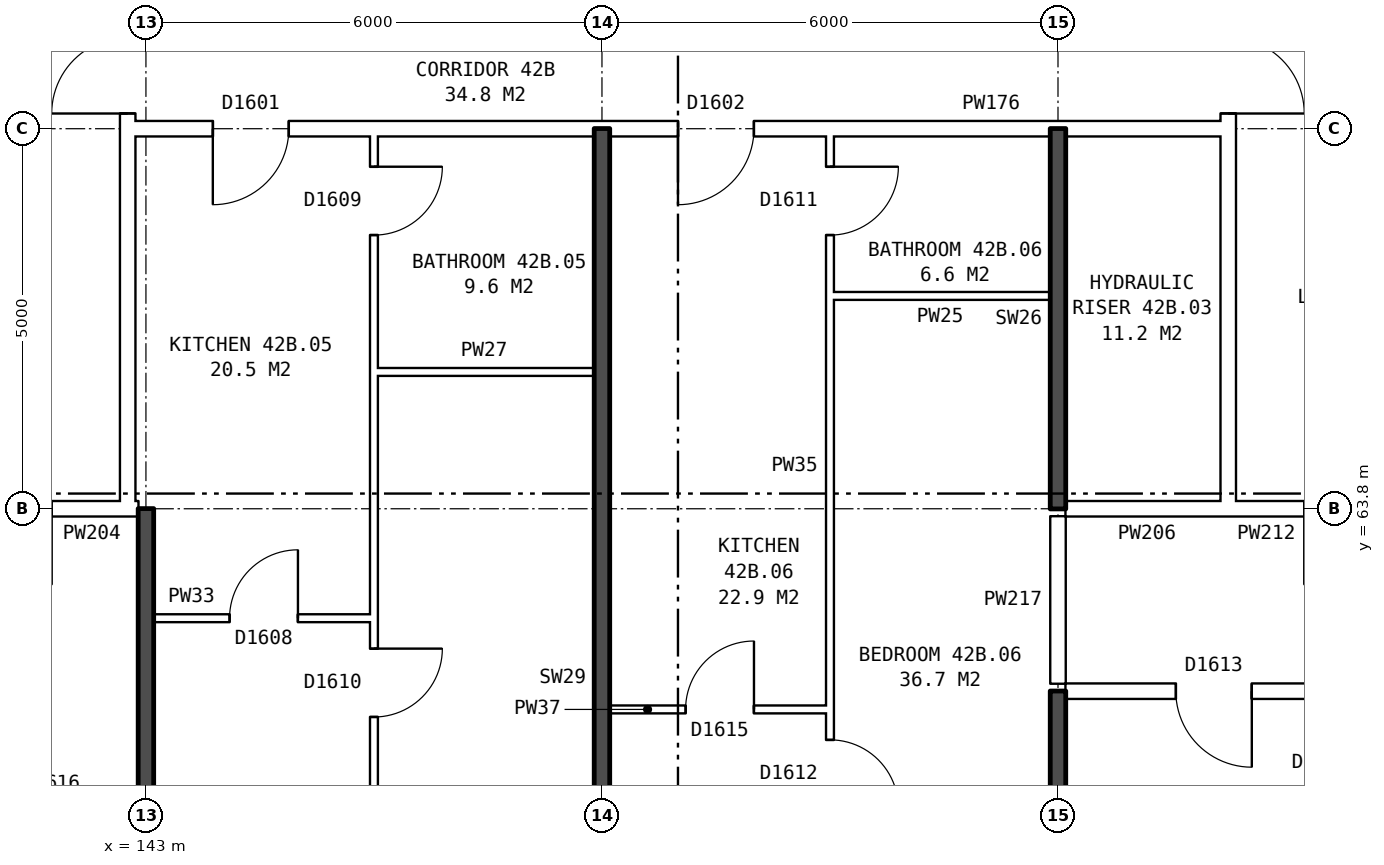
"""IFC4 building model, lengths in metres.
Left out: names, types, materials, properties, quantities, classifications, styles, units other than length and angle.
Written with IfcOpenShell. Run it as: python <this file> out.ifc"""

import sys

from ifc_helpers import new_model, si_unit, direction, frame, frame_2d, origin, place, context, subcontext, project, spatial, rectangle, extrude, element, fill, save


model = new_model("IFC4")
c1 = context("Model", 3, precision=1e-05, world=origin(), true_north=direction((0.0, 1.0)))
c2 = subcontext(c1, "Body", "Model", "MODEL_VIEW")
j1 = project(units=[si_unit("LENGTHUNIT", "METRE"), si_unit("PLANEANGLEUNIT", "RADIAN")], contexts=[c1])
p1 = place(None, origin())
s1 = spatial("IfcSite", under=j1, at=p1, CompositionType="ELEMENT")
p2 = place(p1, origin())
s2 = spatial("IfcBuilding", under=s1, at=p2, CompositionType="ELEMENT")
p3 = place(p2, frame((0.0, 0.0, 151.6)))
s3 = spatial("IfcBuildingStorey", under=s2, at=p3, CompositionType="ELEMENT", Elevation=151.6)
p4 = place(p3, frame((142.76, 63.9, 0.0), z_axis=(0.0, 0.0, 1.0), x_axis=(0.0, 1.0, 0.0)))
e1 = element("IfcWall", 1, at=p4, inside=s3, PredefinedType="PARTITIONING", context=c2, shape_type="SweptSolid", body=[
    extrude(rectangle(XDim=12.2, YDim=0.2, at=frame_2d((6.1, 0.0))), origin(), (0.0, 0.0, 1.0), 2.85),
])
p5 = place(p4, frame((5.1, 0.0, 0.0)))
e2 = element("IfcOpeningElement", 2, at=p5, cuts=e1, PredefinedType="OPENING", context=c2, shape_type="SweptSolid", body=[
    extrude(rectangle(XDim=2.0, YDim=2.1, at=frame_2d((1.0, 1.05))), frame((0.0, 0.11, 0.0), z_axis=(0.0, -1.0, 0.0), x_axis=(1.0, 0.0, 0.0)), (0.0, 0.0, 1.0), 0.22),
])
p6 = place(p3, frame((157.24, 63.9, 0.0), z_axis=(0.0, 0.0, 1.0), x_axis=(0.0, 1.0, 0.0)))
e3 = element("IfcWall", 3, at=p6, inside=s3, PredefinedType="PARTITIONING", context=c2, shape_type="SweptSolid", body=[
    extrude(rectangle(XDim=12.2, YDim=0.2, at=frame_2d((6.1, 0.0))), origin(), (0.0, 0.0, 1.0), 2.85),
])
p7 = place(p6, frame((5.1, 0.0, 0.0)))
e4 = element("IfcOpeningElement", 4, at=p7, cuts=e3, PredefinedType="OPENING", context=c2, shape_type="SweptSolid", body=[
    extrude(rectangle(XDim=2.0, YDim=2.1, at=frame_2d((1.0, 1.05))), frame((0.0, 0.11, 0.0), z_axis=(0.0, -1.0, 0.0), x_axis=(1.0, 0.0, 0.0)), (0.0, 0.0, 1.0), 0.22),
])
p8 = place(p3, frame((149.1, 61.16, 0.0), z_axis=(0.0, 0.0, 1.0), x_axis=(1.0, 0.0, 0.0)))
e5 = element("IfcWall", 5, at=p8, inside=s3, PredefinedType="PARTITIONING", context=c2, shape_type="SweptSolid", body=[
    extrude(rectangle(XDim=2.9, YDim=0.1, at=frame_2d((1.45, 0.0))), origin(), (0.0, 0.0, 1.0), 2.85),
])
p9 = place(p8, frame((1.0, 0.0, 0.0)))
e6 = element("IfcOpeningElement", 6, at=p9, cuts=e5, PredefinedType="OPENING", context=c2, shape_type="SweptSolid", body=[
    extrude(rectangle(XDim=0.9, YDim=2.1, at=frame_2d((0.45, 1.05))), frame((0.0, 0.06, 0.0), z_axis=(0.0, -1.0, 0.0), x_axis=(1.0, 0.0, 0.0)), (0.0, 0.0, 1.0), 0.12),
])
p10 = place(p3, frame((155.1, 61.4, 0.0), z_axis=(0.0, 0.0, 1.0), x_axis=(1.0, 0.0, 0.0)))
e7 = element("IfcWall", 7, at=p10, inside=s3, PredefinedType="PARTITIONING", context=c2, shape_type="SweptSolid", body=[
    extrude(rectangle(XDim=16.04, YDim=0.2, at=frame_2d((8.02, 0.0))), origin(), (0.0, 0.0, 1.0), 2.85),
])
p11 = place(p10, frame((1.45, 0.0, 0.0)))
e8 = element("IfcOpeningElement", 8, at=p11, cuts=e7, PredefinedType="OPENING", context=c2, shape_type="SweptSolid", body=[
    extrude(rectangle(XDim=1.0, YDim=2.1, at=frame_2d((0.5, 1.05))), frame((0.0, 0.11, 0.0), z_axis=(0.0, -1.0, 0.0), x_axis=(1.0, 0.0, 0.0)), (0.0, 0.0, 1.0), 0.22),
])
p12 = place(p10, frame((8.4, 0.0, 0.0)))
e9 = element("IfcOpeningElement", 9, at=p12, cuts=e7, PredefinedType="OPENING", context=c2, shape_type="SweptSolid", body=[
    extrude(rectangle(XDim=1.0, YDim=2.1, at=frame_2d((0.5, 1.05))), frame((0.0, 0.11, 0.0), z_axis=(0.0, -1.0, 0.0), x_axis=(1.0, 0.0, 0.0)), (0.0, 0.0, 1.0), 0.22),
])
p13 = place(p3, frame((143.1, 62.36, 0.0), z_axis=(0.0, 0.0, 1.0), x_axis=(1.0, 0.0, 0.0)))
e10 = element("IfcWall", 10, at=p13, inside=s3, PredefinedType="PARTITIONING", context=c2, shape_type="SweptSolid", body=[
    extrude(rectangle(XDim=2.9, YDim=0.1, at=frame_2d((1.45, 0.0))), origin(), (0.0, 0.0, 1.0), 2.85),
])
p14 = place(p13, frame((1.0, 0.0, 0.0)))
e11 = element("IfcOpeningElement", 11, at=p14, cuts=e10, PredefinedType="OPENING", context=c2, shape_type="SweptSolid", body=[
    extrude(rectangle(XDim=0.9, YDim=2.1, at=frame_2d((0.45, 1.05))), frame((0.0, 0.06, 0.0), z_axis=(0.0, -1.0, 0.0), x_axis=(1.0, 0.0, 0.0)), (0.0, 0.0, 1.0), 0.12),
])
p15 = place(p3, frame((139.76, 63.8, 0.0), z_axis=(0.0, 0.0, 1.0), x_axis=(1.0, 0.0, 0.0)))
e12 = element("IfcWall", 12, at=p15, inside=s3, PredefinedType="PARTITIONING", context=c2, shape_type="SweptSolid", body=[
    extrude(rectangle(XDim=3.0, YDim=0.2, at=frame_2d((1.5, 0.0))), origin(), (0.0, 0.0, 1.0), 2.85),
])
p16 = place(p15, frame((1.0, 0.0, 0.0)))
e13 = element("IfcOpeningElement", 13, at=p16, cuts=e12, PredefinedType="OPENING", context=c2, shape_type="SweptSolid", body=[
    extrude(rectangle(XDim=1.0, YDim=2.1, at=frame_2d((0.5, 1.05))), frame((0.0, 0.11, 0.0), z_axis=(0.0, -1.0, 0.0), x_axis=(1.0, 0.0, 0.0)), (0.0, 0.0, 1.0), 0.22),
])
p17 = place(p3, frame((142.76, 63.8, 0.0), z_axis=(0.0, 0.0, 1.0), x_axis=(1.0, 0.0, 0.0)))
e14 = element("IfcWall", 14, at=p17, inside=s3, PredefinedType="PARTITIONING", context=c2, shape_type="SweptSolid", body=[
    extrude(rectangle(XDim=0.14, YDim=0.2, at=frame_2d((0.07, 0.0))), origin(), (0.0, 0.0, 1.0), 2.85),
])
p18 = place(p3, frame((155.1, 63.8, 0.0), z_axis=(0.0, 0.0, 1.0), x_axis=(1.0, 0.0, 0.0)))
e15 = element("IfcWall", 15, at=p18, inside=s3, PredefinedType="PARTITIONING", context=c2, shape_type="SweptSolid", body=[
    extrude(rectangle(XDim=2.14, YDim=0.2, at=frame_2d((1.07, 0.0))), origin(), (0.0, 0.0, 1.0), 2.85),
])
p19 = place(p3, frame((157.24, 63.8, 0.0), z_axis=(0.0, 0.0, 1.0), x_axis=(1.0, 0.0, 0.0)))
e16 = element("IfcWall", 16, at=p19, inside=s3, PredefinedType="PARTITIONING", context=c2, shape_type="SweptSolid", body=[
    extrude(rectangle(XDim=3.0, YDim=0.2, at=frame_2d((1.5, 0.0))), origin(), (0.0, 0.0, 1.0), 2.85),
])
p20 = place(p19, frame((1.0, 0.0, 0.0)))
e17 = element("IfcOpeningElement", 17, at=p20, cuts=e16, PredefinedType="OPENING", context=c2, shape_type="SweptSolid", body=[
    extrude(rectangle(XDim=1.0, YDim=2.1, at=frame_2d((0.5, 1.05))), frame((0.0, 0.11, 0.0), z_axis=(0.0, -1.0, 0.0), x_axis=(1.0, 0.0, 0.0)), (0.0, 0.0, 1.0), 0.22),
])
for number, where, z_axis, x_axis in (
    (18, (146.0, 65.6, 0.0), (0.0, 0.0, 1.0), (1.0, 0.0, 0.0)),
    (19, (152.0, 66.6, 0.0), (0.0, 0.0, 1.0), (1.0, 0.0, 0.0)),
):
    element("IfcWall", number, at=place(p3, frame(where, z_axis=z_axis, x_axis=x_axis)), inside=s3, PredefinedType="PARTITIONING", context=c2, shape_type="SweptSolid", body=[
        extrude(rectangle(XDim=2.9, YDim=0.1, at=frame_2d((1.45, 0.0))), origin(), (0.0, 0.0, 1.0), 2.85),
    ])
p21 = place(p3, frame((142.76, 68.8, 0.0), z_axis=(0.0, 0.0, 1.0), x_axis=(1.0, 0.0, 0.0)))
e20 = element("IfcWall", 20, at=p21, inside=s3, PredefinedType="PARTITIONING", context=c2, shape_type="SweptSolid", body=[
    extrude(rectangle(XDim=14.48, YDim=0.2, at=frame_2d((7.24, 0.0))), origin(), (0.0, 0.0, 1.0), 2.85),
])
p22 = place(p21, frame((1.12, 0.0, 0.0)))
e21 = element("IfcOpeningElement", 21, at=p22, cuts=e20, PredefinedType="OPENING", context=c2, shape_type="SweptSolid", body=[
    extrude(rectangle(XDim=1.0, YDim=2.1, at=frame_2d((0.5, 1.05))), frame((0.0, 0.11, 0.0), z_axis=(0.0, -1.0, 0.0), x_axis=(1.0, 0.0, 0.0)), (0.0, 0.0, 1.0), 0.22),
])
p23 = place(p21, frame((7.24, 0.0, 0.0)))
e22 = element("IfcOpeningElement", 22, at=p23, cuts=e20, PredefinedType="OPENING", context=c2, shape_type="SweptSolid", body=[
    extrude(rectangle(XDim=1.0, YDim=2.1, at=frame_2d((0.5, 1.05))), frame((0.0, 0.11, 0.0), z_axis=(0.0, -1.0, 0.0), x_axis=(1.0, 0.0, 0.0)), (0.0, 0.0, 1.0), 0.22),
])
p24 = place(p3, frame((143.0, 54.36, 0.0), z_axis=(0.0, 0.0, 1.0), x_axis=(0.0, 1.0, 0.0)))
e23 = element("IfcWall", 23, at=p24, inside=s3, PredefinedType="SOLIDWALL", context=c2, shape_type="SweptSolid", body=[
    extrude(rectangle(XDim=9.44, YDim=0.2, at=frame_2d((4.72, 0.0))), origin(), (0.0, 0.0, 1.0), 2.85),
])
p25 = place(p3, frame((146.0, 54.36, 0.0), z_axis=(0.0, 0.0, 1.0), x_axis=(0.0, 1.0, 0.0)))
e24 = element("IfcWall", 24, at=p25, inside=s3, PredefinedType="PARTITIONING", context=c2, shape_type="SweptSolid", body=[
    extrude(rectangle(XDim=14.34, YDim=0.1, at=frame_2d((7.17, 0.0))), origin(), (0.0, 0.0, 1.0), 2.85),
])
p26 = place(p25, frame((6.7, 0.0, 0.0)))
e25 = element("IfcOpeningElement", 25, at=p26, cuts=e24, PredefinedType="OPENING", context=c2, shape_type="SweptSolid", body=[
    extrude(rectangle(XDim=0.9, YDim=2.1, at=frame_2d((0.45, 1.05))), frame((0.0, 0.06, 0.0), z_axis=(0.0, -1.0, 0.0), x_axis=(1.0, 0.0, 0.0)), (0.0, 0.0, 1.0), 0.12),
])
p27 = place(p25, frame((13.04, 0.0, 0.0)))
e26 = element("IfcOpeningElement", 26, at=p27, cuts=e24, PredefinedType="OPENING", context=c2, shape_type="SweptSolid", body=[
    extrude(rectangle(XDim=0.9, YDim=2.1, at=frame_2d((0.45, 1.05))), frame((0.0, 0.06, 0.0), z_axis=(0.0, -1.0, 0.0), x_axis=(1.0, 0.0, 0.0)), (0.0, 0.0, 1.0), 0.12),
])
p28 = place(p3, frame((149.0, 54.36, 0.0), z_axis=(0.0, 0.0, 1.0), x_axis=(0.0, 1.0, 0.0)))
e27 = element("IfcWall", 27, at=p28, inside=s3, PredefinedType="SOLIDWALL", context=c2, shape_type="SweptSolid", body=[
    extrude(rectangle(XDim=14.44, YDim=0.2, at=frame_2d((7.22, 0.0))), origin(), (0.0, 0.0, 1.0), 2.85),
])
p29 = place(p3, frame((152.0, 54.36, 0.0), z_axis=(0.0, 0.0, 1.0), x_axis=(0.0, 1.0, 0.0)))
e28 = element("IfcWall", 28, at=p29, inside=s3, PredefinedType="PARTITIONING", context=c2, shape_type="SweptSolid", body=[
    extrude(rectangle(XDim=14.34, YDim=0.1, at=frame_2d((7.17, 0.0))), origin(), (0.0, 0.0, 1.0), 2.85),
])
p30 = place(p29, frame((5.5, 0.0, 0.0)))
e29 = element("IfcOpeningElement", 29, at=p30, cuts=e28, PredefinedType="OPENING", context=c2, shape_type="SweptSolid", body=[
    extrude(rectangle(XDim=0.9, YDim=2.1, at=frame_2d((0.45, 1.05))), frame((0.0, 0.06, 0.0), z_axis=(0.0, -1.0, 0.0), x_axis=(1.0, 0.0, 0.0)), (0.0, 0.0, 1.0), 0.12),
])
p31 = place(p29, frame((13.04, 0.0, 0.0)))
e30 = element("IfcOpeningElement", 30, at=p31, cuts=e28, PredefinedType="OPENING", context=c2, shape_type="SweptSolid", body=[
    extrude(rectangle(XDim=0.9, YDim=2.1, at=frame_2d((0.45, 1.05))), frame((0.0, 0.06, 0.0), z_axis=(0.0, -1.0, 0.0), x_axis=(1.0, 0.0, 0.0)), (0.0, 0.0, 1.0), 0.12),
])
p32 = place(p3, frame((155.0, 54.36, 0.0), z_axis=(0.0, 0.0, 1.0), x_axis=(0.0, 1.0, 0.0)))
e31 = element("IfcWall", 31, at=p32, inside=s3, PredefinedType="SOLIDWALL", context=c2, shape_type="SweptSolid", body=[
    extrude(rectangle(XDim=7.04, YDim=0.2, at=frame_2d((3.52, 0.0))), origin(), (0.0, 0.0, 1.0), 2.85),
])
p33 = place(p3, frame((155.0, 61.5, 0.0), z_axis=(0.0, 0.0, 1.0), x_axis=(0.0, 1.0, 0.0)))
e32 = element("IfcWall", 32, at=p33, inside=s3, PredefinedType="PARTITIONING", context=c2, shape_type="SweptSolid", body=[
    extrude(rectangle(XDim=2.2, YDim=0.2, at=frame_2d((1.1, 0.0))), origin(), (0.0, 0.0, 1.0), 2.85),
])
p34 = place(p3, frame((155.0, 63.8, 0.0), z_axis=(0.0, 0.0, 1.0), x_axis=(0.0, 1.0, 0.0)))
e33 = element("IfcWall", 33, at=p34, inside=s3, PredefinedType="SOLIDWALL", context=c2, shape_type="SweptSolid", body=[
    extrude(rectangle(XDim=5.0, YDim=0.2, at=frame_2d((2.5, 0.0))), origin(), (0.0, 0.0, 1.0), 2.85),
])
p35 = place(p5, origin())
e34 = element("IfcDoor", 34, at=p35, inside=s3, OperationType="DOUBLE_DOOR_SINGLE_SWING", PredefinedType="DOOR", context=c2, shape_type="SweptSolid", body=[
    extrude(rectangle(XDim=2.0, YDim=2.1, at=frame_2d((1.0, 1.05))), frame((0.0, 0.025, 0.0), z_axis=(0.0, -1.0, 0.0), x_axis=(1.0, 0.0, 0.0)), (0.0, 0.0, 1.0), 0.05),
])
fill(e2, e34)
p36 = place(p7, frame((2.0, 0.0, 0.0), z_axis=(0.0, 0.0, 1.0), x_axis=(-1.0, 0.0, 0.0)))
e35 = element("IfcDoor", 35, at=p36, inside=s3, OperationType="DOUBLE_DOOR_SINGLE_SWING", PredefinedType="DOOR", context=c2, shape_type="SweptSolid", body=[
    extrude(rectangle(XDim=2.0, YDim=2.1, at=frame_2d((1.0, 1.05))), frame((0.0, 0.025, 0.0), z_axis=(0.0, -1.0, 0.0), x_axis=(1.0, 0.0, 0.0)), (0.0, 0.0, 1.0), 0.05),
])
fill(e4, e35)
p37 = place(p26, frame((0.9, 0.0, 0.0), z_axis=(0.0, 0.0, 1.0), x_axis=(-1.0, 0.0, 0.0)))
e36 = element("IfcDoor", 36, at=p37, inside=s3, OperationType="SINGLE_SWING_LEFT", PredefinedType="DOOR", context=c2, shape_type="SweptSolid", body=[
    extrude(rectangle(XDim=0.9, YDim=2.1, at=frame_2d((0.45, 1.05))), frame((0.0, 0.025, 0.0), z_axis=(0.0, -1.0, 0.0), x_axis=(1.0, 0.0, 0.0)), (0.0, 0.0, 1.0), 0.05),
])
fill(e25, e36)
p38 = place(p22, frame((1.0, 0.0, 0.0), z_axis=(0.0, 0.0, 1.0), x_axis=(-1.0, 0.0, 0.0)))
e37 = element("IfcDoor", 37, at=p38, inside=s3, OperationType="SINGLE_SWING_RIGHT", PredefinedType="DOOR", context=c2, shape_type="SweptSolid", body=[
    extrude(rectangle(XDim=1.0, YDim=2.1, at=frame_2d((0.5, 1.05))), frame((0.0, 0.025, 0.0), z_axis=(0.0, -1.0, 0.0), x_axis=(1.0, 0.0, 0.0)), (0.0, 0.0, 1.0), 0.05),
])
fill(e21, e37)
p39 = place(p14, origin())
e38 = element("IfcDoor", 38, at=p39, inside=s3, OperationType="SINGLE_SWING_RIGHT", PredefinedType="DOOR", context=c2, shape_type="SweptSolid", body=[
    extrude(rectangle(XDim=0.9, YDim=2.1, at=frame_2d((0.45, 1.05))), frame((0.0, 0.025, 0.0), z_axis=(0.0, -1.0, 0.0), x_axis=(1.0, 0.0, 0.0)), (0.0, 0.0, 1.0), 0.05),
])
fill(e11, e38)
p40 = place(p27, frame((0.9, 0.0, 0.0), z_axis=(0.0, 0.0, 1.0), x_axis=(-1.0, 0.0, 0.0)))
e39 = element("IfcDoor", 39, at=p40, inside=s3, OperationType="SINGLE_SWING_LEFT", PredefinedType="DOOR", context=c2, shape_type="SweptSolid", body=[
    extrude(rectangle(XDim=0.9, YDim=2.1, at=frame_2d((0.45, 1.05))), frame((0.0, 0.025, 0.0), z_axis=(0.0, -1.0, 0.0), x_axis=(1.0, 0.0, 0.0)), (0.0, 0.0, 1.0), 0.05),
])
fill(e26, e39)
p41 = place(p30, frame((0.9, 0.0, 0.0), z_axis=(0.0, 0.0, 1.0), x_axis=(-1.0, 0.0, 0.0)))
e40 = element("IfcDoor", 40, at=p41, inside=s3, OperationType="SINGLE_SWING_RIGHT", PredefinedType="DOOR", context=c2, shape_type="SweptSolid", body=[
    extrude(rectangle(XDim=0.9, YDim=2.1, at=frame_2d((0.45, 1.05))), frame((0.0, 0.025, 0.0), z_axis=(0.0, -1.0, 0.0), x_axis=(1.0, 0.0, 0.0)), (0.0, 0.0, 1.0), 0.05),
])
fill(e29, e40)
p42 = place(p23, frame((1.0, 0.0, 0.0), z_axis=(0.0, 0.0, 1.0), x_axis=(-1.0, 0.0, 0.0)))
e41 = element("IfcDoor", 41, at=p42, inside=s3, OperationType="SINGLE_SWING_RIGHT", PredefinedType="DOOR", context=c2, shape_type="SweptSolid", body=[
    extrude(rectangle(XDim=1.0, YDim=2.1, at=frame_2d((0.5, 1.05))), frame((0.0, 0.025, 0.0), z_axis=(0.0, -1.0, 0.0), x_axis=(1.0, 0.0, 0.0)), (0.0, 0.0, 1.0), 0.05),
])
fill(e22, e41)
p43 = place(p9, origin())
e42 = element("IfcDoor", 42, at=p43, inside=s3, OperationType="SINGLE_SWING_RIGHT", PredefinedType="DOOR", context=c2, shape_type="SweptSolid", body=[
    extrude(rectangle(XDim=0.9, YDim=2.1, at=frame_2d((0.45, 1.05))), frame((0.0, 0.025, 0.0), z_axis=(0.0, -1.0, 0.0), x_axis=(1.0, 0.0, 0.0)), (0.0, 0.0, 1.0), 0.05),
])
fill(e6, e42)
p44 = place(p31, frame((0.9, 0.0, 0.0), z_axis=(0.0, 0.0, 1.0), x_axis=(-1.0, 0.0, 0.0)))
e43 = element("IfcDoor", 43, at=p44, inside=s3, OperationType="SINGLE_SWING_LEFT", PredefinedType="DOOR", context=c2, shape_type="SweptSolid", body=[
    extrude(rectangle(XDim=0.9, YDim=2.1, at=frame_2d((0.45, 1.05))), frame((0.0, 0.025, 0.0), z_axis=(0.0, -1.0, 0.0), x_axis=(1.0, 0.0, 0.0)), (0.0, 0.0, 1.0), 0.05),
])
fill(e30, e43)
p45 = place(p11, frame((1.0, 0.0, 0.0), z_axis=(0.0, 0.0, 1.0), x_axis=(-1.0, 0.0, 0.0)))
e44 = element("IfcDoor", 44, at=p45, inside=s3, OperationType="SINGLE_SWING_LEFT", PredefinedType="DOOR", context=c2, shape_type="SweptSolid", body=[
    extrude(rectangle(XDim=1.0, YDim=2.1, at=frame_2d((0.5, 1.05))), frame((0.0, 0.025, 0.0), z_axis=(0.0, -1.0, 0.0), x_axis=(1.0, 0.0, 0.0)), (0.0, 0.0, 1.0), 0.05),
])
fill(e8, e44)
save(model, sys.argv[1])
